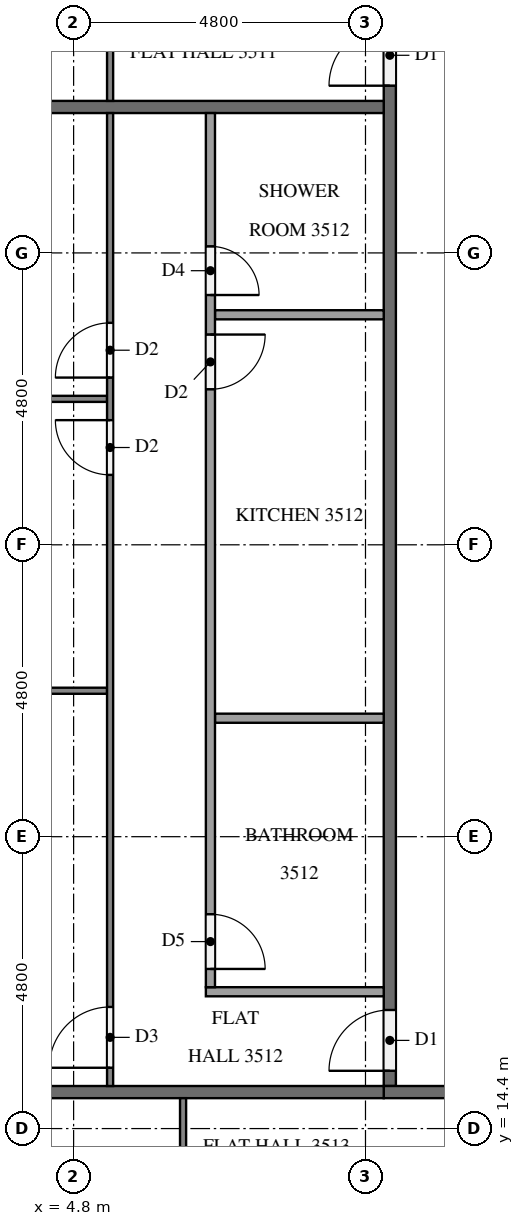
"""IFC4 building model, lengths in metres.
Left out: names, types, materials, properties, quantities, classifications, styles, units other than length and angle.
Written with IfcOpenShell. Run it as: python <this file> out.ifc"""

import sys

from ifc_helpers import new_model, si_unit, direction, frame, frame_2d, origin, place, context, subcontext, project, spatial, rectangle, extrude, element, fill, save


model = new_model("IFC4")
c1 = context("Model", 3, precision=1e-05, world=origin(), true_north=direction((0.0, 1.0)))
c2 = subcontext(c1, "Body", "Model", "MODEL_VIEW")
j1 = project(units=[si_unit("LENGTHUNIT", "METRE"), si_unit("PLANEANGLEUNIT", "RADIAN")], contexts=[c1])
p1 = place(None, origin())
s1 = spatial("IfcSite", under=j1, at=p1, CompositionType="ELEMENT")
p2 = place(p1, origin())
s2 = spatial("IfcBuilding", under=s1, at=p2, CompositionType="ELEMENT")
p3 = place(p2, frame((0.0, 0.0, 136.6)))
s3 = spatial("IfcBuildingStorey", under=s2, at=p3, CompositionType="ELEMENT", Elevation=136.6)
p4 = place(p3, frame((10.0, 15.1, 0.0), z_axis=(0.0, 0.0, 1.0), x_axis=(0.0, 1.0, 0.0)))
e1 = element("IfcWall", 1, at=p4, inside=s3, PredefinedType="PARTITIONING", context=c2, shape_type="SweptSolid", body=[
    extrude(rectangle(XDim=22.6, YDim=0.2, at=frame_2d((11.3, 0.0))), origin(), (0.0, 0.0, 1.0), 3.2),
])
p5 = place(p4, frame((16.45, 0.0, 0.0)))
e2 = element("IfcOpeningElement", 2, at=p5, cuts=e1, PredefinedType="OPENING", context=c2, shape_type="SweptSolid", body=[
    extrude(rectangle(XDim=1.0, YDim=2.1, at=frame_2d((0.5, 1.05))), frame((0.0, 0.11, 0.0), z_axis=(0.0, -1.0, 0.0), x_axis=(1.0, 0.0, 0.0)), (0.0, 0.0, 1.0), 0.22),
])
p6 = place(p4, frame((0.25, 0.0, 0.0)))
e3 = element("IfcOpeningElement", 3, at=p6, cuts=e1, PredefinedType="OPENING", context=c2, shape_type="SweptSolid", body=[
    extrude(rectangle(XDim=1.0, YDim=2.1, at=frame_2d((0.5, 1.05))), frame((0.0, 0.11, 0.0), z_axis=(0.0, -1.0, 0.0), x_axis=(1.0, 0.0, 0.0)), (0.0, 0.0, 1.0), 0.22),
])
p7 = place(p3, frame((9.9, 15.0, 0.0), z_axis=(0.0, 0.0, 1.0), x_axis=(1.0, 0.0, 0.0)))
e4 = element("IfcWall", 4, at=p7, inside=s3, PredefinedType="PARTITIONING", context=c2, shape_type="SweptSolid", body=[
    extrude(rectangle(XDim=2.2, YDim=0.2, at=frame_2d((1.1, 0.0))), origin(), (0.0, 0.0, 1.0), 3.2),
])
for number, where, z_axis, x_axis in (
    (5, (0.1, 31.2, 0.0), (0.0, 0.0, 1.0), (1.0, 0.0, 0.0)),
    (6, (0.1, 15.0, 0.0), (0.0, 0.0, 1.0), (1.0, 0.0, 0.0)),
):
    element("IfcWall", number, at=place(p3, frame(where, z_axis=z_axis, x_axis=x_axis)), inside=s3, PredefinedType="PARTITIONING", context=c2, shape_type="SweptSolid", body=[
        extrude(rectangle(XDim=9.8, YDim=0.2, at=frame_2d((4.9, 0.0))), origin(), (0.0, 0.0, 1.0), 3.2),
    ])
p8 = place(p3, frame((5.4, 31.3, 0.0), z_axis=(0.0, 0.0, 1.0), x_axis=(0.0, 1.0, 0.0)))
e7 = element("IfcWall", 7, at=p8, inside=s3, PredefinedType="PARTITIONING", context=c2, shape_type="SweptSolid", body=[
    extrude(rectangle(XDim=6.4, YDim=0.1, at=frame_2d((3.2, 0.0))), origin(), (0.0, 0.0, 1.0), 3.2),
])
p9 = place(p8, frame((5.1, 0.0, 0.0)))
e8 = element("IfcOpeningElement", 8, at=p9, cuts=e7, PredefinedType="OPENING", context=c2, shape_type="SweptSolid", body=[
    extrude(rectangle(XDim=1.0, YDim=2.1, at=frame_2d((0.5, 1.05))), frame((0.0, 0.06, 0.0), z_axis=(0.0, -1.0, 0.0), x_axis=(1.0, 0.0, 0.0)), (0.0, 0.0, 1.0), 0.12),
])
for number, where, z_axis, x_axis in (
    (9, (5.35, 21.6, 0.0), (0.0, 0.0, 1.0), (-1.0, 0.0, 0.0)),
    (10, (5.35, 26.4, 0.0), (0.0, 0.0, 1.0), (-1.0, 0.0, 0.0)),
):
    element("IfcWall", number, at=place(p3, frame(where, z_axis=z_axis, x_axis=x_axis)), inside=s3, PredefinedType="PARTITIONING", context=c2, shape_type="SweptSolid", body=[
        extrude(rectangle(XDim=5.25, YDim=0.1, at=frame_2d((2.625, 0.0))), origin(), (0.0, 0.0, 1.0), 3.2),
    ])
p10 = place(p3, frame((5.4, 15.1, 0.0), z_axis=(0.0, 0.0, 1.0), x_axis=(0.0, 1.0, 0.0)))
e11 = element("IfcWall", 11, at=p10, inside=s3, PredefinedType="PARTITIONING", context=c2, shape_type="SweptSolid", body=[
    extrude(rectangle(XDim=16.0, YDim=0.1, at=frame_2d((8.0, 0.0))), origin(), (0.0, 0.0, 1.0), 3.2),
])
p11 = place(p10, frame((0.3, 0.0, 0.0)))
e12 = element("IfcOpeningElement", 12, at=p11, cuts=e11, PredefinedType="OPENING", context=c2, shape_type="SweptSolid", body=[
    extrude(rectangle(XDim=1.0, YDim=2.1, at=frame_2d((0.5, 1.05))), frame((0.0, 0.06, 0.0), z_axis=(0.0, -1.0, 0.0), x_axis=(1.0, 0.0, 0.0)), (0.0, 0.0, 1.0), 0.12),
])
p12 = place(p10, frame((10.05, 0.0, 0.0)))
e13 = element("IfcOpeningElement", 13, at=p12, cuts=e11, PredefinedType="OPENING", context=c2, shape_type="SweptSolid", body=[
    extrude(rectangle(XDim=0.9, YDim=2.1, at=frame_2d((0.45, 1.05))), frame((0.0, 0.06, 0.0), z_axis=(0.0, -1.0, 0.0), x_axis=(1.0, 0.0, 0.0)), (0.0, 0.0, 1.0), 0.12),
])
p13 = place(p10, frame((11.65, 0.0, 0.0)))
e14 = element("IfcOpeningElement", 14, at=p13, cuts=e11, PredefinedType="OPENING", context=c2, shape_type="SweptSolid", body=[
    extrude(rectangle(XDim=0.9, YDim=2.1, at=frame_2d((0.45, 1.05))), frame((0.0, 0.06, 0.0), z_axis=(0.0, -1.0, 0.0), x_axis=(1.0, 0.0, 0.0)), (0.0, 0.0, 1.0), 0.12),
])
for number, where, z_axis, x_axis in (
    (15, (9.9, 21.148, 0.0), (0.0, 0.0, 1.0), (-1.0, 0.0, 0.0)),
    (16, (9.9, 27.783, 0.0), (0.0, 0.0, 1.0), (-1.0, 0.0, 0.0)),
):
    element("IfcWall", number, at=place(p3, frame(where, z_axis=z_axis, x_axis=x_axis)), inside=s3, PredefinedType="PARTITIONING", context=c2, shape_type="SweptSolid", body=[
        extrude(rectangle(XDim=2.775, YDim=0.15, at=frame_2d((1.387, 0.0))), origin(), (0.0, 0.0, 1.0), 3.2),
    ])
p14 = place(p3, frame((9.9, 16.65, 0.0), z_axis=(0.0, 0.0, 1.0), x_axis=(-1.0, 0.0, 0.0)))
e17 = element("IfcWall", 17, at=p14, inside=s3, PredefinedType="PARTITIONING", context=c2, shape_type="SweptSolid", body=[
    extrude(rectangle(XDim=2.925, YDim=0.15, at=frame_2d((1.462, 0.0))), origin(), (0.0, 0.0, 1.0), 3.2),
])
p15 = place(p3, frame((7.05, 31.1, 0.0), z_axis=(0.0, 0.0, 1.0), x_axis=(0.0, -1.0, 0.0)))
e18 = element("IfcWall", 18, at=p15, inside=s3, PredefinedType="PARTITIONING", context=c2, shape_type="SweptSolid", body=[
    extrude(rectangle(XDim=14.375, YDim=0.15, at=frame_2d((7.188, 0.0))), origin(), (0.0, 0.0, 1.0), 3.2),
])
p16 = place(p15, frame((13.175, 0.0, 0.0)))
e19 = element("IfcOpeningElement", 19, at=p16, cuts=e18, PredefinedType="OPENING", context=c2, shape_type="SweptSolid", body=[
    extrude(rectangle(XDim=0.9, YDim=2.1, at=frame_2d((0.45, 1.05))), frame((0.0, 0.085, 0.0), z_axis=(0.0, -1.0, 0.0), x_axis=(1.0, 0.0, 0.0)), (0.0, 0.0, 1.0), 0.17),
])
p17 = place(p15, frame((3.642, 0.0, 0.0)))
e20 = element("IfcOpeningElement", 20, at=p17, cuts=e18, PredefinedType="OPENING", context=c2, shape_type="SweptSolid", body=[
    extrude(rectangle(XDim=0.9, YDim=2.1, at=frame_2d((0.45, 1.05))), frame((0.0, 0.085, 0.0), z_axis=(0.0, -1.0, 0.0), x_axis=(1.0, 0.0, 0.0)), (0.0, 0.0, 1.0), 0.17),
])
p18 = place(p15, frame((2.192, 0.0, 0.0)))
e21 = element("IfcOpeningElement", 21, at=p18, cuts=e18, PredefinedType="OPENING", context=c2, shape_type="SweptSolid", body=[
    extrude(rectangle(XDim=0.8, YDim=2.1, at=frame_2d((0.4, 1.05))), frame((0.0, 0.085, 0.0), z_axis=(0.0, -1.0, 0.0), x_axis=(1.0, 0.0, 0.0)), (0.0, 0.0, 1.0), 0.17),
])
p19 = place(p3, frame((6.6, 4.9, 0.0), z_axis=(0.0, 0.0, 1.0), x_axis=(0.0, 1.0, 0.0)))
e22 = element("IfcWall", 22, at=p19, inside=s3, PredefinedType="PARTITIONING", context=c2, shape_type="SweptSolid", body=[
    extrude(rectangle(XDim=10.0, YDim=0.1, at=frame_2d((5.0, 0.0))), origin(), (0.0, 0.0, 1.0), 3.2),
])
p20 = place(p19, frame((5.05, 0.0, 0.0)))
e23 = element("IfcOpeningElement", 23, at=p20, cuts=e22, PredefinedType="OPENING", context=c2, shape_type="SweptSolid", body=[
    extrude(rectangle(XDim=1.0, YDim=2.1, at=frame_2d((0.5, 1.05))), frame((0.0, 0.06, 0.0), z_axis=(0.0, -1.0, 0.0), x_axis=(1.0, 0.0, 0.0)), (0.0, 0.0, 1.0), 0.12),
])
p21 = place(p19, frame((3.45, 0.0, 0.0)))
e24 = element("IfcOpeningElement", 24, at=p21, cuts=e22, PredefinedType="OPENING", context=c2, shape_type="SweptSolid", body=[
    extrude(rectangle(XDim=0.9, YDim=2.1, at=frame_2d((0.45, 1.05))), frame((0.0, 0.06, 0.0), z_axis=(0.0, -1.0, 0.0), x_axis=(1.0, 0.0, 0.0)), (0.0, 0.0, 1.0), 0.12),
])
p22 = place(p5, origin())
e25 = element("IfcDoor", 25, at=p22, inside=s3, OperationType="SINGLE_SWING_LEFT", PredefinedType="DOOR", context=c2, shape_type="SweptSolid", body=[
    extrude(rectangle(XDim=1.0, YDim=2.1, at=frame_2d((0.5, 1.05))), frame((0.0, 0.025, 0.0), z_axis=(0.0, -1.0, 0.0), x_axis=(1.0, 0.0, 0.0)), (0.0, 0.0, 1.0), 0.05),
])
fill(e2, e25)
p23 = place(p6, origin())
e26 = element("IfcDoor", 26, at=p23, inside=s3, OperationType="SINGLE_SWING_LEFT", PredefinedType="DOOR", context=c2, shape_type="SweptSolid", body=[
    extrude(rectangle(XDim=1.0, YDim=2.1, at=frame_2d((0.5, 1.05))), frame((0.0, 0.025, 0.0), z_axis=(0.0, -1.0, 0.0), x_axis=(1.0, 0.0, 0.0)), (0.0, 0.0, 1.0), 0.05),
])
fill(e3, e26)
p24 = place(p11, origin())
e27 = element("IfcDoor", 27, at=p24, inside=s3, OperationType="SINGLE_SWING_LEFT", PredefinedType="DOOR", context=c2, shape_type="SweptSolid", body=[
    extrude(rectangle(XDim=1.0, YDim=2.1, at=frame_2d((0.5, 1.05))), frame((0.0, 0.025, 0.0), z_axis=(0.0, -1.0, 0.0), x_axis=(1.0, 0.0, 0.0)), (0.0, 0.0, 1.0), 0.05),
])
fill(e12, e27)
p25 = place(p12, origin())
e28 = element("IfcDoor", 28, at=p25, inside=s3, OperationType="SINGLE_SWING_RIGHT", PredefinedType="DOOR", context=c2, shape_type="SweptSolid", body=[
    extrude(rectangle(XDim=0.9, YDim=2.1, at=frame_2d((0.45, 1.05))), frame((0.0, 0.025, 0.0), z_axis=(0.0, -1.0, 0.0), x_axis=(1.0, 0.0, 0.0)), (0.0, 0.0, 1.0), 0.05),
])
fill(e13, e28)
p26 = place(p13, origin())
e29 = element("IfcDoor", 29, at=p26, inside=s3, OperationType="SINGLE_SWING_LEFT", PredefinedType="DOOR", context=c2, shape_type="SweptSolid", body=[
    extrude(rectangle(XDim=0.9, YDim=2.1, at=frame_2d((0.45, 1.05))), frame((0.0, 0.025, 0.0), z_axis=(0.0, -1.0, 0.0), x_axis=(1.0, 0.0, 0.0)), (0.0, 0.0, 1.0), 0.05),
])
fill(e14, e29)
p27 = place(p16, origin())
e30 = element("IfcDoor", 30, at=p27, inside=s3, OperationType="SINGLE_SWING_RIGHT", PredefinedType="DOOR", context=c2, shape_type="SweptSolid", body=[
    extrude(rectangle(XDim=0.9, YDim=2.1, at=frame_2d((0.45, 1.05))), frame((0.0, 0.025, 0.0), z_axis=(0.0, -1.0, 0.0), x_axis=(1.0, 0.0, 0.0)), (0.0, 0.0, 1.0), 0.05),
])
fill(e19, e30)
p28 = place(p17, origin())
e31 = element("IfcDoor", 31, at=p28, inside=s3, OperationType="SINGLE_SWING_LEFT", PredefinedType="DOOR", context=c2, shape_type="SweptSolid", body=[
    extrude(rectangle(XDim=0.9, YDim=2.1, at=frame_2d((0.45, 1.05))), frame((0.0, 0.025, 0.0), z_axis=(0.0, -1.0, 0.0), x_axis=(1.0, 0.0, 0.0)), (0.0, 0.0, 1.0), 0.05),
])
fill(e20, e31)
p29 = place(p18, origin())
e32 = element("IfcDoor", 32, at=p29, inside=s3, OperationType="SINGLE_SWING_RIGHT", PredefinedType="DOOR", context=c2, shape_type="SweptSolid", body=[
    extrude(rectangle(XDim=0.8, YDim=2.1, at=frame_2d((0.4, 1.05))), frame((0.0, 0.025, 0.0), z_axis=(0.0, -1.0, 0.0), x_axis=(1.0, 0.0, 0.0)), (0.0, 0.0, 1.0), 0.05),
])
fill(e21, e32)
save(model, sys.argv[1])
